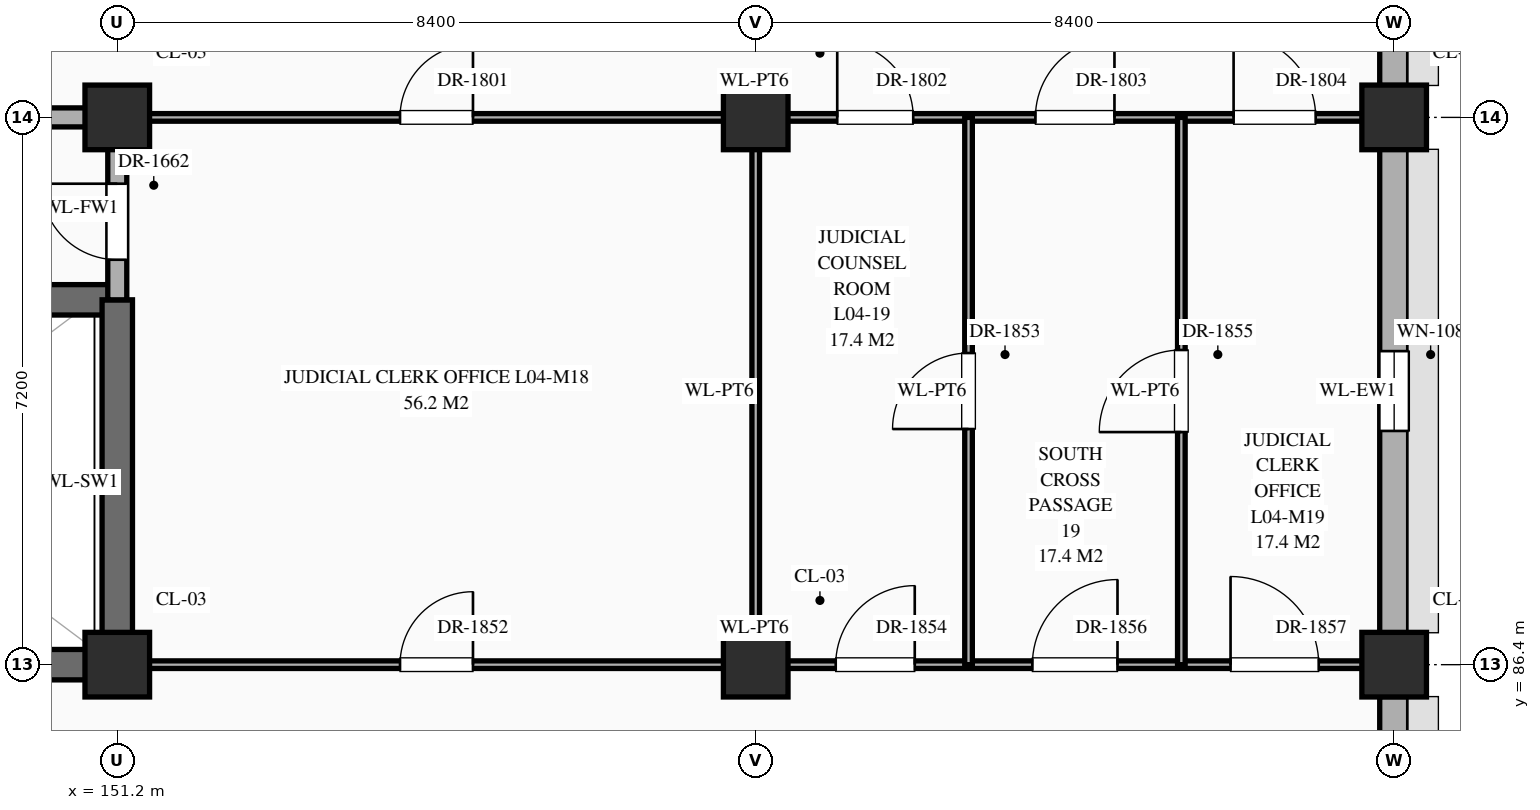
"""IFC4 building model, lengths in metres.
Left out: names, types, materials, properties, quantities, classifications, styles, units other than length and angle.
Written with IfcOpenShell. Run it as: python <this file> out.ifc"""

import sys

from ifc_helpers import new_model, si_unit, direction, frame, frame_2d, origin, origin_2d, place, context, subcontext, project, spatial, rectangle, extrude, element, fill, save


model = new_model("IFC4")
c1 = context("Model", 3, precision=1e-05, world=origin(), true_north=direction((0.0, 1.0)))
c2 = subcontext(c1, "Body", "Model", "MODEL_VIEW")
j1 = project(units=[si_unit("LENGTHUNIT", "METRE"), si_unit("PLANEANGLEUNIT", "RADIAN")], contexts=[c1])
p1 = place(None, origin())
s1 = spatial("IfcSite", under=j1, at=p1, CompositionType="ELEMENT")
p2 = place(p1, origin())
s2 = spatial("IfcBuilding", under=s1, at=p2, CompositionType="ELEMENT")
p3 = place(p2, frame((0.0, 0.0, 16.2)))
s3 = spatial("IfcBuildingStorey", under=s2, at=p3, CompositionType="ELEMENT", Elevation=16.2)
for number, where, z_axis, x_axis in (
    (1, (151.2, 86.4, 0.0), (0.0, 0.0, 1.0), (1.0, 0.0, 0.0)),
    (2, (151.2, 93.6, 0.0), (0.0, 0.0, 1.0), (1.0, 0.0, 0.0)),
    (3, (159.6, 86.4, 0.0), (0.0, 0.0, 1.0), (1.0, 0.0, 0.0)),
    (4, (159.6, 93.6, 0.0), (0.0, 0.0, 1.0), (1.0, 0.0, 0.0)),
    (5, (168.0, 86.4, 0.0), (0.0, 0.0, 1.0), (1.0, 0.0, 0.0)),
    (6, (168.0, 93.6, 0.0), (0.0, 0.0, 1.0), (1.0, 0.0, 0.0)),
):
    element("IfcColumn", number, at=place(p3, frame(where, z_axis=z_axis, x_axis=x_axis)), inside=s3, PredefinedType="COLUMN", context=c2, shape_type="SweptSolid", body=[
        extrude(rectangle(XDim=0.85, YDim=0.85, at=origin_2d()), origin(), (0.0, 0.0, 1.0), 5.4),
    ])
p4 = place(p3, frame((168.0, 79.62, 0.0), z_axis=(0.0, 0.0, 1.0), x_axis=(0.0, 1.0, 0.0)))
e7 = element("IfcWall", 7, at=p4, inside=s3, PredefinedType="STANDARD", context=c2, shape_type="SweptSolid", body=[
    extrude(rectangle(XDim=6.36, YDim=0.38, at=frame_2d((3.18, 0.0))), origin(), (0.0, 0.0, 1.0), 4.55),
])
p5 = place(p4, frame((1.38, 0.0, 0.85)))
e8 = element("IfcOpeningElement", 8, at=p5, cuts=e7, PredefinedType="OPENING", context=c2, shape_type="SweptSolid", body=[
    extrude(rectangle(XDim=1.2, YDim=1.74, at=frame_2d((0.6, 0.87))), frame((0.0, 0.202, 0.0), z_axis=(0.0, -1.0, 0.0), x_axis=(1.0, 0.0, 0.0)), (0.0, 0.0, 1.0), 0.404),
])
p6 = place(p3, frame((168.0, 86.82, 0.0), z_axis=(0.0, 0.0, 1.0), x_axis=(0.0, 1.0, 0.0)))
e9 = element("IfcWall", 9, at=p6, inside=s3, PredefinedType="STANDARD", context=c2, shape_type="SweptSolid", body=[
    extrude(rectangle(XDim=6.36, YDim=0.38, at=frame_2d((3.18, 0.0))), origin(), (0.0, 0.0, 1.0), 4.55),
])
p7 = place(p6, frame((2.655, 0.0, 0.85)))
e10 = element("IfcOpeningElement", 10, at=p7, cuts=e9, PredefinedType="OPENING", context=c2, shape_type="SweptSolid", body=[
    extrude(rectangle(XDim=1.05, YDim=1.92, at=frame_2d((0.525, 0.96))), frame((0.0, 0.202, 0.0), z_axis=(0.0, -1.0, 0.0), x_axis=(1.0, 0.0, 0.0)), (0.0, 0.0, 1.0), 0.404),
])
p8 = place(p3, frame((168.0, 94.02, 0.0), z_axis=(0.0, 0.0, 1.0), x_axis=(0.0, 1.0, 0.0)))
e11 = element("IfcWall", 11, at=p8, inside=s3, PredefinedType="STANDARD", context=c2, shape_type="SweptSolid", body=[
    extrude(rectangle(XDim=6.36, YDim=0.38, at=frame_2d((3.18, 0.0))), origin(), (0.0, 0.0, 1.0), 4.55),
])
p9 = place(p8, frame((3.805, 0.0, 0.85)))
e12 = element("IfcOpeningElement", 12, at=p9, cuts=e11, PredefinedType="OPENING", context=c2, shape_type="SweptSolid", body=[
    extrude(rectangle(XDim=1.35, YDim=2.12, at=frame_2d((0.675, 1.06))), frame((0.0, 0.202, 0.0), z_axis=(0.0, -1.0, 0.0), x_axis=(1.0, 0.0, 0.0)), (0.0, 0.0, 1.0), 0.404),
])
p10 = place(p3, frame((142.8, 86.4, 0.0), z_axis=(0.0, 0.0, 1.0), x_axis=(1.0, 0.0, 0.0)))
e13 = element("IfcWall", 13, at=p10, inside=s3, PredefinedType="SHEAR", context=c2, shape_type="SweptSolid", body=[
    extrude(rectangle(XDim=8.4, YDim=0.4, at=frame_2d((4.2, 0.0))), origin(), (0.0, 0.0, 1.0), 5.05),
])
p11 = place(p3, frame((151.2, 86.4, 0.0), z_axis=(0.0, 0.0, 1.0), x_axis=(1.0, 0.0, 0.0)))
e14 = element("IfcWall", 14, at=p11, inside=s3, PredefinedType="STANDARD", context=c2, shape_type="SweptSolid", body=[
    extrude(rectangle(XDim=16.76, YDim=0.1, at=frame_2d((8.38, 0.0))), origin(), (0.0, 0.0, 1.0), 4.35),
])
p12 = place(p11, frame((3.72, 0.0, 0.0)))
e15 = element("IfcOpeningElement", 15, at=p12, cuts=e14, PredefinedType="OPENING", context=c2, shape_type="SweptSolid", body=[
    extrude(rectangle(XDim=0.96, YDim=2.2, at=frame_2d((0.48, 1.1))), frame((0.0, 0.062, 0.0), z_axis=(0.0, -1.0, 0.0), x_axis=(1.0, 0.0, 0.0)), (0.0, 0.0, 1.0), 0.124),
])
p13 = place(p11, frame((9.452, 0.0, 0.0)))
e16 = element("IfcOpeningElement", 16, at=p13, cuts=e14, PredefinedType="OPENING", context=c2, shape_type="SweptSolid", body=[
    extrude(rectangle(XDim=1.04, YDim=2.2, at=frame_2d((0.52, 1.1))), frame((0.0, 0.062, 0.0), z_axis=(0.0, -1.0, 0.0), x_axis=(1.0, 0.0, 0.0)), (0.0, 0.0, 1.0), 0.124),
])
p14 = place(p11, frame((12.04, 0.0, 0.0)))
e17 = element("IfcOpeningElement", 17, at=p14, cuts=e14, PredefinedType="OPENING", context=c2, shape_type="SweptSolid", body=[
    extrude(rectangle(XDim=1.12, YDim=2.25, at=frame_2d((0.56, 1.125))), frame((0.0, 0.062, 0.0), z_axis=(0.0, -1.0, 0.0), x_axis=(1.0, 0.0, 0.0)), (0.0, 0.0, 1.0), 0.124),
])
p15 = place(p11, frame((14.647, 0.0, 0.0)))
e18 = element("IfcOpeningElement", 18, at=p15, cuts=e14, PredefinedType="OPENING", context=c2, shape_type="SweptSolid", body=[
    extrude(rectangle(XDim=1.16, YDim=2.3, at=frame_2d((0.58, 1.15))), frame((0.0, 0.062, 0.0), z_axis=(0.0, -1.0, 0.0), x_axis=(1.0, 0.0, 0.0)), (0.0, 0.0, 1.0), 0.124),
])
p16 = place(p3, frame((142.8, 91.2, 0.0), z_axis=(0.0, 0.0, 1.0), x_axis=(1.0, 0.0, 0.0)))
e19 = element("IfcWall", 19, at=p16, inside=s3, PredefinedType="SHEAR", context=c2, shape_type="SweptSolid", body=[
    extrude(rectangle(XDim=8.4, YDim=0.4, at=frame_2d((4.2, 0.0))), origin(), (0.0, 0.0, 1.0), 5.05),
])
p17 = place(p16, frame((0.65, 0.0, 0.0)))
e20 = element("IfcOpeningElement", 20, at=p17, cuts=e19, PredefinedType="OPENING", context=c2, shape_type="SweptSolid", body=[
    extrude(rectangle(XDim=1.1, YDim=2.2, at=frame_2d((0.55, 1.1))), frame((0.0, 0.212, 0.0), z_axis=(0.0, -1.0, 0.0), x_axis=(1.0, 0.0, 0.0)), (0.0, 0.0, 1.0), 0.424),
])
p18 = place(p3, frame((142.8, 93.6, 0.0), z_axis=(0.0, 0.0, 1.0), x_axis=(1.0, 0.0, 0.0)))
e21 = element("IfcWall", 21, at=p18, inside=s3, PredefinedType="STANDARD", context=c2, shape_type="SweptSolid", body=[
    extrude(rectangle(XDim=8.4, YDim=0.25, at=frame_2d((4.2, 0.0))), origin(), (0.0, 0.0, 1.0), 4.2),
])
p19 = place(p18, frame((3.4, 0.0, 0.0)))
e22 = element("IfcOpeningElement", 22, at=p19, cuts=e21, PredefinedType="OPENING", context=c2, shape_type="SweptSolid", body=[
    extrude(rectangle(XDim=1.6, YDim=2.3, at=frame_2d((0.8, 1.15))), frame((0.0, 0.137, 0.0), z_axis=(0.0, -1.0, 0.0), x_axis=(1.0, 0.0, 0.0)), (0.0, 0.0, 1.0), 0.274),
])
p20 = place(p3, frame((151.2, 93.6, 0.0), z_axis=(0.0, 0.0, 1.0), x_axis=(1.0, 0.0, 0.0)))
e23 = element("IfcWall", 23, at=p20, inside=s3, PredefinedType="STANDARD", context=c2, shape_type="SweptSolid", body=[
    extrude(rectangle(XDim=16.76, YDim=0.1, at=frame_2d((8.38, 0.0))), origin(), (0.0, 0.0, 1.0), 4.35),
])
p21 = place(p20, frame((3.72, 0.0, 0.0)))
e24 = element("IfcOpeningElement", 24, at=p21, cuts=e23, PredefinedType="OPENING", context=c2, shape_type="SweptSolid", body=[
    extrude(rectangle(XDim=0.96, YDim=2.2, at=frame_2d((0.48, 1.1))), frame((0.0, 0.062, 0.0), z_axis=(0.0, -1.0, 0.0), x_axis=(1.0, 0.0, 0.0)), (0.0, 0.0, 1.0), 0.124),
])
p22 = place(p20, frame((9.472, 0.0, 0.0)))
e25 = element("IfcOpeningElement", 25, at=p22, cuts=e23, PredefinedType="OPENING", context=c2, shape_type="SweptSolid", body=[
    extrude(rectangle(XDim=1.0, YDim=2.25, at=frame_2d((0.5, 1.125))), frame((0.0, 0.062, 0.0), z_axis=(0.0, -1.0, 0.0), x_axis=(1.0, 0.0, 0.0)), (0.0, 0.0, 1.0), 0.124),
])
p23 = place(p20, frame((12.08, 0.0, 0.0)))
e26 = element("IfcOpeningElement", 26, at=p23, cuts=e23, PredefinedType="OPENING", context=c2, shape_type="SweptSolid", body=[
    extrude(rectangle(XDim=1.04, YDim=2.2, at=frame_2d((0.52, 1.1))), frame((0.0, 0.062, 0.0), z_axis=(0.0, -1.0, 0.0), x_axis=(1.0, 0.0, 0.0)), (0.0, 0.0, 1.0), 0.124),
])
p24 = place(p20, frame((14.688, 0.0, 0.0)))
e27 = element("IfcOpeningElement", 27, at=p24, cuts=e23, PredefinedType="OPENING", context=c2, shape_type="SweptSolid", body=[
    extrude(rectangle(XDim=1.08, YDim=2.25, at=frame_2d((0.54, 1.125))), frame((0.0, 0.062, 0.0), z_axis=(0.0, -1.0, 0.0), x_axis=(1.0, 0.0, 0.0)), (0.0, 0.0, 1.0), 0.124),
])
p25 = place(p3, frame((151.2, 86.4, 0.0), z_axis=(0.0, 0.0, 1.0), x_axis=(0.0, 1.0, 0.0)))
e28 = element("IfcWall", 28, at=p25, inside=s3, PredefinedType="SHEAR", context=c2, shape_type="SweptSolid", body=[
    extrude(rectangle(XDim=4.8, YDim=0.4, at=frame_2d((2.4, 0.0))), origin(), (0.0, 0.0, 1.0), 5.05),
])
p26 = place(p3, frame((151.2, 91.2, 0.0), z_axis=(0.0, 0.0, 1.0), x_axis=(0.0, 1.0, 0.0)))
e29 = element("IfcWall", 29, at=p26, inside=s3, PredefinedType="STANDARD", context=c2, shape_type="SweptSolid", body=[
    extrude(rectangle(XDim=2.4, YDim=0.25, at=frame_2d((1.2, 0.0))), origin(), (0.0, 0.0, 1.0), 4.3),
])
p27 = place(p26, frame((0.528, 0.0, 0.0)))
e30 = element("IfcOpeningElement", 30, at=p27, cuts=e29, PredefinedType="OPENING", context=c2, shape_type="SweptSolid", body=[
    extrude(rectangle(XDim=1.0, YDim=2.2, at=frame_2d((0.5, 1.1))), frame((0.0, 0.137, 0.0), z_axis=(0.0, -1.0, 0.0), x_axis=(1.0, 0.0, 0.0)), (0.0, 0.0, 1.0), 0.274),
])
p28 = place(p3, frame((159.6, 86.4, 0.0), z_axis=(0.0, 0.0, 1.0), x_axis=(0.0, 1.0, 0.0)))
e31 = element("IfcWall", 31, at=p28, inside=s3, PredefinedType="STANDARD", context=c2, shape_type="SweptSolid", body=[
    extrude(rectangle(XDim=7.2, YDim=0.1, at=frame_2d((3.6, 0.0))), origin(), (0.0, 0.0, 1.0), 4.45),
])
p29 = place(p3, frame((162.4, 86.4, 0.0), z_axis=(0.0, 0.0, 1.0), x_axis=(0.0, 1.0, 0.0)))
e32 = element("IfcWall", 32, at=p29, inside=s3, PredefinedType="STANDARD", context=c2, shape_type="SweptSolid", body=[
    extrude(rectangle(XDim=7.2, YDim=0.1, at=frame_2d((3.6, 0.0))), origin(), (0.0, 0.0, 1.0), 5.2),
])
p30 = place(p29, frame((3.1, 0.0, 0.0)))
e33 = element("IfcOpeningElement", 33, at=p30, cuts=e32, PredefinedType="OPENING", context=c2, shape_type="SweptSolid", body=[
    extrude(rectangle(XDim=1.0, YDim=2.25, at=frame_2d((0.5, 1.125))), frame((0.0, 0.062, 0.0), z_axis=(0.0, -1.0, 0.0), x_axis=(1.0, 0.0, 0.0)), (0.0, 0.0, 1.0), 0.124),
])
p31 = place(p3, frame((165.2, 86.4, 0.0), z_axis=(0.0, 0.0, 1.0), x_axis=(0.0, 1.0, 0.0)))
e34 = element("IfcWall", 34, at=p31, inside=s3, PredefinedType="STANDARD", context=c2, shape_type="SweptSolid", body=[
    extrude(rectangle(XDim=7.2, YDim=0.1, at=frame_2d((3.6, 0.0))), origin(), (0.0, 0.0, 1.0), 5.2),
])
p32 = place(p31, frame((3.06, 0.0, 0.0)))
e35 = element("IfcOpeningElement", 35, at=p32, cuts=e34, PredefinedType="OPENING", context=c2, shape_type="SweptSolid", body=[
    extrude(rectangle(XDim=1.08, YDim=2.25, at=frame_2d((0.54, 1.125))), frame((0.0, 0.062, 0.0), z_axis=(0.0, -1.0, 0.0), x_axis=(1.0, 0.0, 0.0)), (0.0, 0.0, 1.0), 0.124),
])
p33 = place(p7, origin())
e36 = element("IfcWindow", 36, at=p33, inside=s3, PartitioningType="SINGLE_PANEL", PredefinedType="WINDOW", context=c2, shape_type="SweptSolid", body=[
    extrude(rectangle(XDim=1.05, YDim=1.92, at=frame_2d((0.525, 0.96))), frame((0.0, 0.03, 0.0), z_axis=(0.0, -1.0, 0.0), x_axis=(1.0, 0.0, 0.0)), (0.0, 0.0, 1.0), 0.06),
])
fill(e10, e36)
p34 = place(p27, origin())
e37 = element("IfcDoor", 37, at=p34, inside=s3, OperationType="SINGLE_SWING_RIGHT", PredefinedType="DOOR", context=c2, shape_type="SweptSolid", body=[
    extrude(rectangle(XDim=1.0, YDim=2.2, at=frame_2d((0.5, 1.1))), frame((0.0, 0.025, 0.0), z_axis=(0.0, -1.0, 0.0), x_axis=(1.0, 0.0, 0.0)), (0.0, 0.0, 1.0), 0.05),
])
fill(e30, e37)
p35 = place(p21, origin())
e38 = element("IfcDoor", 38, at=p35, inside=s3, OperationType="SINGLE_SWING_RIGHT", PredefinedType="DOOR", context=c2, shape_type="SweptSolid", body=[
    extrude(rectangle(XDim=0.96, YDim=2.2, at=frame_2d((0.48, 1.1))), frame((0.0, 0.025, 0.0), z_axis=(0.0, -1.0, 0.0), x_axis=(1.0, 0.0, 0.0)), (0.0, 0.0, 1.0), 0.05),
])
fill(e24, e38)
p36 = place(p22, origin())
e39 = element("IfcDoor", 39, at=p36, inside=s3, OperationType="SINGLE_SWING_LEFT", PredefinedType="DOOR", context=c2, shape_type="SweptSolid", body=[
    extrude(rectangle(XDim=1.0, YDim=2.25, at=frame_2d((0.5, 1.125))), frame((0.0, 0.025, 0.0), z_axis=(0.0, -1.0, 0.0), x_axis=(1.0, 0.0, 0.0)), (0.0, 0.0, 1.0), 0.05),
])
fill(e25, e39)
p37 = place(p23, origin())
e40 = element("IfcDoor", 40, at=p37, inside=s3, OperationType="SINGLE_SWING_RIGHT", PredefinedType="DOOR", context=c2, shape_type="SweptSolid", body=[
    extrude(rectangle(XDim=1.04, YDim=2.2, at=frame_2d((0.52, 1.1))), frame((0.0, 0.025, 0.0), z_axis=(0.0, -1.0, 0.0), x_axis=(1.0, 0.0, 0.0)), (0.0, 0.0, 1.0), 0.05),
])
fill(e26, e40)
p38 = place(p24, origin())
e41 = element("IfcDoor", 41, at=p38, inside=s3, OperationType="SINGLE_SWING_LEFT", PredefinedType="DOOR", context=c2, shape_type="SweptSolid", body=[
    extrude(rectangle(XDim=1.08, YDim=2.25, at=frame_2d((0.54, 1.125))), frame((0.0, 0.025, 0.0), z_axis=(0.0, -1.0, 0.0), x_axis=(1.0, 0.0, 0.0)), (0.0, 0.0, 1.0), 0.05),
])
fill(e27, e41)
p39 = place(p12, origin())
e42 = element("IfcDoor", 42, at=p39, inside=s3, OperationType="SINGLE_SWING_RIGHT", PredefinedType="DOOR", context=c2, shape_type="SweptSolid", body=[
    extrude(rectangle(XDim=0.96, YDim=2.2, at=frame_2d((0.48, 1.1))), frame((0.0, 0.025, 0.0), z_axis=(0.0, -1.0, 0.0), x_axis=(1.0, 0.0, 0.0)), (0.0, 0.0, 1.0), 0.05),
])
fill(e15, e42)
p40 = place(p30, origin())
e43 = element("IfcDoor", 43, at=p40, inside=s3, OperationType="SINGLE_SWING_LEFT", PredefinedType="DOOR", context=c2, shape_type="SweptSolid", body=[
    extrude(rectangle(XDim=1.0, YDim=2.25, at=frame_2d((0.5, 1.125))), frame((0.0, 0.025, 0.0), z_axis=(0.0, -1.0, 0.0), x_axis=(1.0, 0.0, 0.0)), (0.0, 0.0, 1.0), 0.05),
])
fill(e33, e43)
p41 = place(p13, origin())
e44 = element("IfcDoor", 44, at=p41, inside=s3, OperationType="SINGLE_SWING_RIGHT", PredefinedType="DOOR", context=c2, shape_type="SweptSolid", body=[
    extrude(rectangle(XDim=1.04, YDim=2.2, at=frame_2d((0.52, 1.1))), frame((0.0, 0.025, 0.0), z_axis=(0.0, -1.0, 0.0), x_axis=(1.0, 0.0, 0.0)), (0.0, 0.0, 1.0), 0.05),
])
fill(e16, e44)
p42 = place(p32, origin())
e45 = element("IfcDoor", 45, at=p42, inside=s3, OperationType="SINGLE_SWING_LEFT", PredefinedType="DOOR", context=c2, shape_type="SweptSolid", body=[
    extrude(rectangle(XDim=1.08, YDim=2.25, at=frame_2d((0.54, 1.125))), frame((0.0, 0.025, 0.0), z_axis=(0.0, -1.0, 0.0), x_axis=(1.0, 0.0, 0.0)), (0.0, 0.0, 1.0), 0.05),
])
fill(e35, e45)
p43 = place(p14, origin())
e46 = element("IfcDoor", 46, at=p43, inside=s3, OperationType="SINGLE_SWING_RIGHT", PredefinedType="DOOR", context=c2, shape_type="SweptSolid", body=[
    extrude(rectangle(XDim=1.12, YDim=2.25, at=frame_2d((0.56, 1.125))), frame((0.0, 0.025, 0.0), z_axis=(0.0, -1.0, 0.0), x_axis=(1.0, 0.0, 0.0)), (0.0, 0.0, 1.0), 0.05),
])
fill(e17, e46)
p44 = place(p15, origin())
e47 = element("IfcDoor", 47, at=p44, inside=s3, OperationType="SINGLE_SWING_LEFT", PredefinedType="DOOR", context=c2, shape_type="SweptSolid", body=[
    extrude(rectangle(XDim=1.16, YDim=2.3, at=frame_2d((0.58, 1.15))), frame((0.0, 0.025, 0.0), z_axis=(0.0, -1.0, 0.0), x_axis=(1.0, 0.0, 0.0)), (0.0, 0.0, 1.0), 0.05),
])
fill(e18, e47)
save(model, sys.argv[1])
